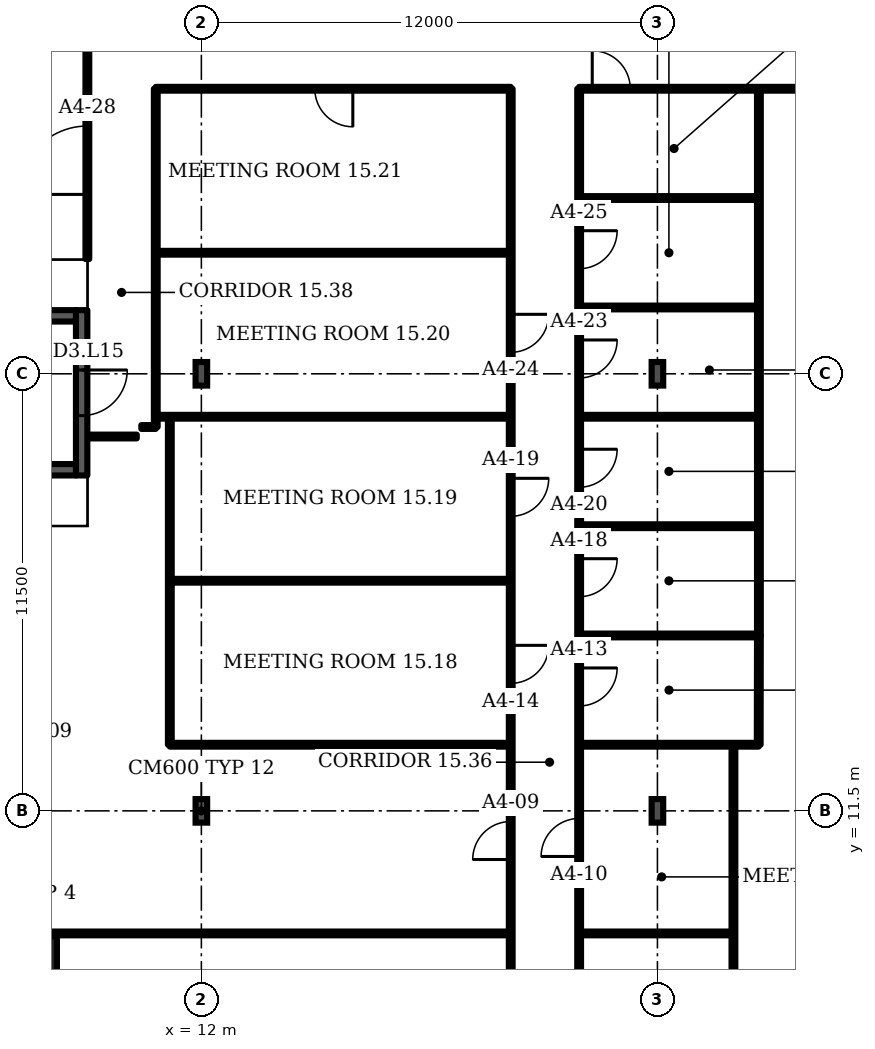
"""IFC4 building model, lengths in metres.
Left out: names, types, materials, properties, quantities, classifications, styles, units other than length and angle.
Written with IfcOpenShell. Run it as: python <this file> out.ifc"""

import sys

from ifc_helpers import new_model, si_unit, direction, frame, frame_2d, origin, origin_2d, place, context, subcontext, project, spatial, rectangle, i_section, extrude, element, fill, save


model = new_model("IFC4")
c1 = context("Model", 3, precision=1e-05, world=origin(), true_north=direction((0.0, 1.0)))
c2 = subcontext(c1, "Body", "Model", "MODEL_VIEW")
j1 = project(units=[si_unit("LENGTHUNIT", "METRE"), si_unit("PLANEANGLEUNIT", "RADIAN")], contexts=[c1])
p1 = place(None, origin())
s1 = spatial("IfcSite", under=j1, at=p1, CompositionType="ELEMENT")
p2 = place(p1, origin())
s2 = spatial("IfcBuilding", under=s1, at=p2, CompositionType="ELEMENT")
p3 = place(p2, frame((0.0, 0.0, 73.9)))
s3 = spatial("IfcBuildingStorey", under=s2, at=p3, CompositionType="ELEMENT", Elevation=73.9)
p4 = place(p3, frame((7.1, 7.1, 0.0), z_axis=(0.0, 0.0, 1.0), x_axis=(1.0, 0.0, 0.0)))
e1 = element("IfcColumn", 1, at=p4, inside=s3, PredefinedType="COLUMN", context=c2, shape_type="SweptSolid", body=[
    extrude(rectangle(XDim=2.2, YDim=2.2, at=origin_2d()), origin(), (0.0, 0.0, 1.0), 3.6),
])
for number, where, z_axis, x_axis in (
    (2, (12.0, 11.5, 0.0), (0.0, 0.0, 1.0), (1.0, 0.0, 0.0)),
    (3, (24.0, 11.5, 0.0), (0.0, 0.0, 1.0), (1.0, 0.0, 0.0)),
    (4, (12.0, 23.0, 0.0), (0.0, 0.0, 1.0), (1.0, 0.0, 0.0)),
    (5, (24.0, 23.0, 0.0), (0.0, 0.0, 1.0), (1.0, 0.0, 0.0)),
):
    element("IfcColumn", number, at=place(p3, frame(where, z_axis=z_axis, x_axis=x_axis)), inside=s3, PredefinedType="COLUMN", context=c2, shape_type="SweptSolid", body=[
        extrude(i_section(OverallWidth=0.305, OverallDepth=0.62, WebThickness=0.021, FlangeThickness=0.04, FilletRadius=0.027, at=origin_2d()), origin(), (0.0, 0.0, 1.0), 3.6),
    ])
p5 = place(p3, frame((8.85, 20.325, 0.0), z_axis=(0.0, 0.0, 1.0), x_axis=(0.0, 1.0, 0.0)))
e6 = element("IfcWall", 6, at=p5, inside=s3, PredefinedType="SHEAR", context=c2, shape_type="SweptSolid", body=[
    extrude(rectangle(XDim=4.35, YDim=0.3, at=frame_2d((2.175, 0.0))), origin(), (0.0, 0.0, 1.0), 3.2),
])
p6 = place(p5, frame((1.575, 0.0, 0.0)))
e7 = element("IfcOpeningElement", 7, at=p6, cuts=e6, PredefinedType="OPENING", context=c2, shape_type="SweptSolid", body=[
    extrude(rectangle(XDim=1.2, YDim=2.1, at=frame_2d((0.6, 1.05))), frame((0.0, 0.16, 0.0), z_axis=(0.0, -1.0, 0.0), x_axis=(1.0, 0.0, 0.0)), (0.0, 0.0, 1.0), 0.32),
])
p7 = place(p3, frame((6.0, 8.275, 0.0), z_axis=(0.0, 0.0, 1.0), x_axis=(1.0, 0.0, 0.0)))
e8 = element("IfcWall", 8, at=p7, inside=s3, PredefinedType="PARTITIONING", context=c2, shape_type="SweptSolid", body=[
    extrude(rectangle(XDim=14.14, YDim=0.1, at=frame_2d((7.07, 0.0))), origin(), (0.0, 0.0, 1.0), 3.2),
])
p8 = place(p3, frame((9.0, 26.02, 0.0), z_axis=(0.0, 0.0, 1.0), x_axis=(0.0, 1.0, 0.0)))
e9 = element("IfcWall", 9, at=p8, inside=s3, PredefinedType="PARTITIONING", context=c2, shape_type="SweptSolid", body=[
    extrude(rectangle(XDim=7.96, YDim=0.1, at=frame_2d((3.98, 0.0))), origin(), (0.0, 0.0, 1.0), 3.2),
])
p9 = place(p8, frame((1.7, 0.0, 0.0)))
e10 = element("IfcOpeningElement", 10, at=p9, cuts=e9, PredefinedType="OPENING", context=c2, shape_type="SweptSolid", body=[
    extrude(rectangle(XDim=1.8, YDim=2.1, at=frame_2d((0.9, 1.05))), frame((0.0, 0.06, 0.0), z_axis=(0.0, -1.0, 0.0), x_axis=(1.0, 0.0, 0.0)), (0.0, 0.0, 1.0), 0.12),
])
p10 = place(p3, frame((9.02, 21.35, 0.0), z_axis=(0.0, 0.0, 1.0), x_axis=(1.0, 0.0, 0.0)))
e11 = element("IfcWall", 11, at=p10, inside=s3, PredefinedType="PARTITIONING", context=c2, shape_type="SweptSolid", body=[
    extrude(rectangle(XDim=1.28, YDim=0.1, at=frame_2d((0.64, 0.0))), origin(), (0.0, 0.0, 1.0), 3.2),
])
p11 = place(p3, frame((10.42, 21.6, 0.0), z_axis=(0.0, 0.0, 1.0), x_axis=(1.0, 0.0, 0.0)))
e12 = element("IfcWall", 12, at=p11, inside=s3, PredefinedType="PARTITIONING", context=c2, shape_type="SweptSolid", body=[
    extrude(rectangle(XDim=0.38, YDim=0.1, at=frame_2d((0.19, 0.0))), origin(), (0.0, 0.0, 1.0), 3.2),
])
p12 = place(p3, frame((10.8, 21.6, 0.0), z_axis=(0.0, 0.0, 1.0), x_axis=(0.0, 1.0, 0.0)))
e13 = element("IfcWall", 13, at=p12, inside=s3, PredefinedType="PARTITIONING", context=c2, shape_type="SweptSolid", body=[
    extrude(rectangle(XDim=8.9, YDim=0.1, at=frame_2d((4.45, 0.0))), origin(), (0.0, 0.0, 1.0), 3.2),
])
for number, where, z_axis, x_axis in (
    (14, (10.8, 21.87, 0.0), (0.0, 0.0, 1.0), (1.0, 0.0, 0.0)),
    (15, (10.8, 26.185, 0.0), (0.0, 0.0, 1.0), (1.0, 0.0, 0.0)),
):
    element("IfcWall", number, at=place(p3, frame(where, z_axis=z_axis, x_axis=x_axis)), inside=s3, PredefinedType="PARTITIONING", context=c2, shape_type="SweptSolid", body=[
        extrude(rectangle(XDim=9.34, YDim=0.1, at=frame_2d((4.67, 0.0))), origin(), (0.0, 0.0, 1.0), 3.2),
    ])
p13 = place(p3, frame((10.8, 30.5, 0.0), z_axis=(0.0, 0.0, 1.0), x_axis=(1.0, 0.0, 0.0)))
e16 = element("IfcWall", 16, at=p13, inside=s3, PredefinedType="PARTITIONING", context=c2, shape_type="SweptSolid", body=[
    extrude(rectangle(XDim=9.34, YDim=0.1, at=frame_2d((4.67, 0.0))), origin(), (0.0, 0.0, 1.0), 3.2),
])
p14 = place(p13, frame((4.185, 0.0, 0.0)))
e17 = element("IfcOpeningElement", 17, at=p14, cuts=e16, PredefinedType="OPENING", context=c2, shape_type="SweptSolid", body=[
    extrude(rectangle(XDim=1.0, YDim=2.1, at=frame_2d((0.5, 1.05))), frame((0.0, 0.06, 0.0), z_axis=(0.0, -1.0, 0.0), x_axis=(1.0, 0.0, 0.0)), (0.0, 0.0, 1.0), 0.12),
])
p15 = place(p3, frame((11.17, 13.24, 0.0), z_axis=(0.0, 0.0, 1.0), x_axis=(0.0, 1.0, 0.0)))
e18 = element("IfcWall", 18, at=p15, inside=s3, PredefinedType="PARTITIONING", context=c2, shape_type="SweptSolid", body=[
    extrude(rectangle(XDim=8.63, YDim=0.1, at=frame_2d((4.315, 0.0))), origin(), (0.0, 0.0, 1.0), 3.2),
])
for number, where, z_axis, x_axis in (
    (19, (11.17, 13.24, 0.0), (0.0, 0.0, 1.0), (1.0, 0.0, 0.0)),
    (20, (11.17, 17.555, 0.0), (0.0, 0.0, 1.0), (1.0, 0.0, 0.0)),
):
    element("IfcWall", number, at=place(p3, frame(where, z_axis=z_axis, x_axis=x_axis)), inside=s3, PredefinedType="PARTITIONING", context=c2, shape_type="SweptSolid", body=[
        extrude(rectangle(XDim=8.97, YDim=0.1, at=frame_2d((4.485, 0.0))), origin(), (0.0, 0.0, 1.0), 3.2),
    ])
p16 = place(p3, frame((20.14, -1.13, 0.0), z_axis=(0.0, 0.0, 1.0), x_axis=(0.0, 1.0, 0.0)))
e21 = element("IfcWall", 21, at=p16, inside=s3, PredefinedType="PARTITIONING", context=c2, shape_type="SweptSolid", body=[
    extrude(rectangle(XDim=31.63, YDim=0.1, at=frame_2d((15.815, 0.0))), origin(), (0.0, 0.0, 1.0), 3.2),
])
p17 = place(p16, frame((1.825, 0.0, 0.0)))
e22 = element("IfcOpeningElement", 22, at=p17, cuts=e21, PredefinedType="OPENING", context=c2, shape_type="SweptSolid", body=[
    extrude(rectangle(XDim=1.0, YDim=2.1, at=frame_2d((0.5, 1.05))), frame((0.0, 0.06, 0.0), z_axis=(0.0, -1.0, 0.0), x_axis=(1.0, 0.0, 0.0)), (0.0, 0.0, 1.0), 0.12),
])
p18 = place(p16, frame((6.305, 0.0, 0.0)))
e23 = element("IfcOpeningElement", 23, at=p18, cuts=e21, PredefinedType="OPENING", context=c2, shape_type="SweptSolid", body=[
    extrude(rectangle(XDim=1.0, YDim=2.1, at=frame_2d((0.5, 1.05))), frame((0.0, 0.06, 0.0), z_axis=(0.0, -1.0, 0.0), x_axis=(1.0, 0.0, 0.0)), (0.0, 0.0, 1.0), 0.12),
])
p19 = place(p16, frame((11.35, 0.0, 0.0)))
e24 = element("IfcOpeningElement", 24, at=p19, cuts=e21, PredefinedType="OPENING", context=c2, shape_type="SweptSolid", body=[
    extrude(rectangle(XDim=1.0, YDim=2.1, at=frame_2d((0.5, 1.05))), frame((0.0, 0.06, 0.0), z_axis=(0.0, -1.0, 0.0), x_axis=(1.0, 0.0, 0.0)), (0.0, 0.0, 1.0), 0.12),
])
p20 = place(p16, frame((15.985, 0.0, 0.0)))
e25 = element("IfcOpeningElement", 25, at=p20, cuts=e21, PredefinedType="OPENING", context=c2, shape_type="SweptSolid", body=[
    extrude(rectangle(XDim=1.0, YDim=2.1, at=frame_2d((0.5, 1.05))), frame((0.0, 0.06, 0.0), z_axis=(0.0, -1.0, 0.0), x_axis=(1.0, 0.0, 0.0)), (0.0, 0.0, 1.0), 0.12),
])
p21 = place(p16, frame((20.38, 0.0, 0.0)))
e26 = element("IfcOpeningElement", 26, at=p21, cuts=e21, PredefinedType="OPENING", context=c2, shape_type="SweptSolid", body=[
    extrude(rectangle(XDim=1.0, YDim=2.1, at=frame_2d((0.5, 1.05))), frame((0.0, 0.06, 0.0), z_axis=(0.0, -1.0, 0.0), x_axis=(1.0, 0.0, 0.0)), (0.0, 0.0, 1.0), 0.12),
])
p22 = place(p16, frame((24.695, 0.0, 0.0)))
e27 = element("IfcOpeningElement", 27, at=p22, cuts=e21, PredefinedType="OPENING", context=c2, shape_type="SweptSolid", body=[
    extrude(rectangle(XDim=1.0, YDim=2.1, at=frame_2d((0.5, 1.05))), frame((0.0, 0.06, 0.0), z_axis=(0.0, -1.0, 0.0), x_axis=(1.0, 0.0, 0.0)), (0.0, 0.0, 1.0), 0.12),
])
p23 = place(p3, frame((21.94, -1.29, 0.0), z_axis=(0.0, 0.0, 1.0), x_axis=(0.0, 1.0, 0.0)))
e28 = element("IfcWall", 28, at=p23, inside=s3, PredefinedType="PARTITIONING", context=c2, shape_type="SweptSolid", body=[
    extrude(rectangle(XDim=31.79, YDim=0.1, at=frame_2d((15.895, 0.0))), origin(), (0.0, 0.0, 1.0), 3.2),
])
p24 = place(p23, frame((1.82, 0.0, 0.0)))
e29 = element("IfcOpeningElement", 29, at=p24, cuts=e28, PredefinedType="OPENING", context=c2, shape_type="SweptSolid", body=[
    extrude(rectangle(XDim=1.0, YDim=2.1, at=frame_2d((0.5, 1.05))), frame((0.0, 0.06, 0.0), z_axis=(0.0, -1.0, 0.0), x_axis=(1.0, 0.0, 0.0)), (0.0, 0.0, 1.0), 0.12),
])
p25 = place(p23, frame((6.63, 0.0, 0.0)))
e30 = element("IfcOpeningElement", 30, at=p25, cuts=e28, PredefinedType="OPENING", context=c2, shape_type="SweptSolid", body=[
    extrude(rectangle(XDim=1.0, YDim=2.1, at=frame_2d((0.5, 1.05))), frame((0.0, 0.06, 0.0), z_axis=(0.0, -1.0, 0.0), x_axis=(1.0, 0.0, 0.0)), (0.0, 0.0, 1.0), 0.12),
])
p26 = place(p23, frame((11.59, 0.0, 0.0)))
e31 = element("IfcOpeningElement", 31, at=p26, cuts=e28, PredefinedType="OPENING", context=c2, shape_type="SweptSolid", body=[
    extrude(rectangle(XDim=1.0, YDim=2.1, at=frame_2d((0.5, 1.05))), frame((0.0, 0.06, 0.0), z_axis=(0.0, -1.0, 0.0), x_axis=(1.0, 0.0, 0.0)), (0.0, 0.0, 1.0), 0.12),
])
p27 = place(p23, frame((15.55, 0.0, 0.0)))
e32 = element("IfcOpeningElement", 32, at=p27, cuts=e28, PredefinedType="OPENING", context=c2, shape_type="SweptSolid", body=[
    extrude(rectangle(XDim=1.0, YDim=2.1, at=frame_2d((0.5, 1.05))), frame((0.0, 0.06, 0.0), z_axis=(0.0, -1.0, 0.0), x_axis=(1.0, 0.0, 0.0)), (0.0, 0.0, 1.0), 0.12),
])
p28 = place(p23, frame((18.425, 0.0, 0.0)))
e33 = element("IfcOpeningElement", 33, at=p28, cuts=e28, PredefinedType="OPENING", context=c2, shape_type="SweptSolid", body=[
    extrude(rectangle(XDim=1.0, YDim=2.1, at=frame_2d((0.5, 1.05))), frame((0.0, 0.06, 0.0), z_axis=(0.0, -1.0, 0.0), x_axis=(1.0, 0.0, 0.0)), (0.0, 0.0, 1.0), 0.12),
])
p29 = place(p23, frame((21.305, 0.0, 0.0)))
e34 = element("IfcOpeningElement", 34, at=p29, cuts=e28, PredefinedType="OPENING", context=c2, shape_type="SweptSolid", body=[
    extrude(rectangle(XDim=1.0, YDim=2.1, at=frame_2d((0.5, 1.05))), frame((0.0, 0.06, 0.0), z_axis=(0.0, -1.0, 0.0), x_axis=(1.0, 0.0, 0.0)), (0.0, 0.0, 1.0), 0.12),
])
p30 = place(p23, frame((24.18, 0.0, 0.0)))
e35 = element("IfcOpeningElement", 35, at=p30, cuts=e28, PredefinedType="OPENING", context=c2, shape_type="SweptSolid", body=[
    extrude(rectangle(XDim=1.0, YDim=2.1, at=frame_2d((0.5, 1.05))), frame((0.0, 0.06, 0.0), z_axis=(0.0, -1.0, 0.0), x_axis=(1.0, 0.0, 0.0)), (0.0, 0.0, 1.0), 0.12),
])
p31 = place(p23, frame((27.055, 0.0, 0.0)))
e36 = element("IfcOpeningElement", 36, at=p31, cuts=e28, PredefinedType="OPENING", context=c2, shape_type="SweptSolid", body=[
    extrude(rectangle(XDim=1.0, YDim=2.1, at=frame_2d((0.5, 1.05))), frame((0.0, 0.06, 0.0), z_axis=(0.0, -1.0, 0.0), x_axis=(1.0, 0.0, 0.0)), (0.0, 0.0, 1.0), 0.12),
])
p32 = place(p3, frame((21.94, 8.275, 0.0), z_axis=(0.0, 0.0, 1.0), x_axis=(1.0, 0.0, 0.0)))
e37 = element("IfcWall", 37, at=p32, inside=s3, PredefinedType="PARTITIONING", context=c2, shape_type="SweptSolid", body=[
    extrude(rectangle(XDim=4.06, YDim=0.1, at=frame_2d((2.03, 0.0))), origin(), (0.0, 0.0, 1.0), 3.2),
])
for number, where, z_axis, x_axis in (
    (38, (21.94, 13.24, 0.0), (0.0, 0.0, 1.0), (1.0, 0.0, 0.0)),
    (39, (21.94, 16.115, 0.0), (0.0, 0.0, 1.0), (1.0, 0.0, 0.0)),
    (40, (21.94, 18.99, 0.0), (0.0, 0.0, 1.0), (1.0, 0.0, 0.0)),
    (41, (21.94, 21.87, 0.0), (0.0, 0.0, 1.0), (1.0, 0.0, 0.0)),
    (42, (21.94, 24.745, 0.0), (0.0, 0.0, 1.0), (1.0, 0.0, 0.0)),
    (43, (21.94, 27.625, 0.0), (0.0, 0.0, 1.0), (1.0, 0.0, 0.0)),
):
    element("IfcWall", number, at=place(p3, frame(where, z_axis=z_axis, x_axis=x_axis)), inside=s3, PredefinedType="PARTITIONING", context=c2, shape_type="SweptSolid", body=[
        extrude(rectangle(XDim=4.725, YDim=0.1, at=frame_2d((2.363, 0.0))), origin(), (0.0, 0.0, 1.0), 3.2),
    ])
p33 = place(p3, frame((21.94, 30.5, 0.0), z_axis=(0.0, 0.0, 1.0), x_axis=(1.0, 0.0, 0.0)))
e44 = element("IfcWall", 44, at=p33, inside=s3, PredefinedType="PARTITIONING", context=c2, shape_type="SweptSolid", body=[
    extrude(rectangle(XDim=14.91, YDim=0.1, at=frame_2d((7.455, 0.0))), origin(), (0.0, 0.0, 1.0), 3.2),
])
p34 = place(p33, frame((0.345, 0.0, 0.0)))
e45 = element("IfcOpeningElement", 45, at=p34, cuts=e44, PredefinedType="OPENING", context=c2, shape_type="SweptSolid", body=[
    extrude(rectangle(XDim=1.0, YDim=2.1, at=frame_2d((0.5, 1.05))), frame((0.0, 0.06, 0.0), z_axis=(0.0, -1.0, 0.0), x_axis=(1.0, 0.0, 0.0)), (0.0, 0.0, 1.0), 0.12),
])
p35 = place(p33, frame((8.95, 0.0, 0.0)))
e46 = element("IfcOpeningElement", 46, at=p35, cuts=e44, PredefinedType="OPENING", context=c2, shape_type="SweptSolid", body=[
    extrude(rectangle(XDim=1.8, YDim=2.1, at=frame_2d((0.9, 1.05))), frame((0.0, 0.06, 0.0), z_axis=(0.0, -1.0, 0.0), x_axis=(1.0, 0.0, 0.0)), (0.0, 0.0, 1.0), 0.12),
])
p36 = place(p3, frame((26.0, -1.645, 0.0), z_axis=(0.0, 0.0, 1.0), x_axis=(0.0, 1.0, 0.0)))
e47 = element("IfcWall", 47, at=p36, inside=s3, PredefinedType="PARTITIONING", context=c2, shape_type="SweptSolid", body=[
    extrude(rectangle(XDim=14.885, YDim=0.1, at=frame_2d((7.442, 0.0))), origin(), (0.0, 0.0, 1.0), 3.2),
])
p37 = place(p3, frame((26.665, 13.24, 0.0), z_axis=(0.0, 0.0, 1.0), x_axis=(0.001698, 0.999995, 0.0)))
e48 = element("IfcWall", 48, at=p37, inside=s3, PredefinedType="PARTITIONING", context=c2, shape_type="SweptSolid", body=[
    extrude(rectangle(XDim=2.875, YDim=0.1, at=frame_2d((1.438, 0.0))), origin(), (0.0, 0.0, 1.0), 3.2),
])
p38 = place(p3, frame((26.67, 16.115, 0.0), z_axis=(0.0, 0.0, 1.0), x_axis=(0.0, 1.0, 0.0)))
e49 = element("IfcWall", 49, at=p38, inside=s3, PredefinedType="PARTITIONING", context=c2, shape_type="SweptSolid", body=[
    extrude(rectangle(XDim=14.385, YDim=0.1, at=frame_2d((7.192, 0.0))), origin(), (0.0, 0.0, 1.0), 3.2),
])
for number, where, z_axis, x_axis in (
    (50, (1.2, 20.475, 0.0), (0.0, 0.0, 1.0), (1.0, 0.0, 0.0)),
    (51, (1.2, 24.525, 0.0), (0.0, 0.0, 1.0), (1.0, 0.0, 0.0)),
):
    element("IfcWall", number, at=place(p3, frame(where, z_axis=z_axis, x_axis=x_axis)), inside=s3, PredefinedType="SHEAR", context=c2, shape_type="SweptSolid", body=[
        extrude(rectangle(XDim=7.5, YDim=0.3, at=frame_2d((3.75, 0.0))), origin(), (0.0, 0.0, 1.0), 3.2),
    ])
p39 = place(p6, origin())
e52 = element("IfcDoor", 52, at=p39, inside=s3, OperationType="SINGLE_SWING_RIGHT", PredefinedType="DOOR", context=c2, shape_type="SweptSolid", body=[
    extrude(rectangle(XDim=1.2, YDim=2.1, at=frame_2d((0.6, 1.05))), frame((0.0, 0.025, 0.0), z_axis=(0.0, -1.0, 0.0), x_axis=(1.0, 0.0, 0.0)), (0.0, 0.0, 1.0), 0.05),
])
fill(e7, e52)
p40 = place(p19, origin())
e53 = element("IfcDoor", 53, at=p40, inside=s3, OperationType="SINGLE_SWING_LEFT", PredefinedType="DOOR", context=c2, shape_type="SweptSolid", body=[
    extrude(rectangle(XDim=1.0, YDim=2.1, at=frame_2d((0.5, 1.05))), frame((0.0, 0.025, 0.0), z_axis=(0.0, -1.0, 0.0), x_axis=(1.0, 0.0, 0.0)), (0.0, 0.0, 1.0), 0.05),
])
fill(e24, e53)
p41 = place(p26, origin())
e54 = element("IfcDoor", 54, at=p41, inside=s3, OperationType="SINGLE_SWING_LEFT", PredefinedType="DOOR", context=c2, shape_type="SweptSolid", body=[
    extrude(rectangle(XDim=1.0, YDim=2.1, at=frame_2d((0.5, 1.05))), frame((0.0, 0.025, 0.0), z_axis=(0.0, -1.0, 0.0), x_axis=(1.0, 0.0, 0.0)), (0.0, 0.0, 1.0), 0.05),
])
fill(e31, e54)
p42 = place(p27, origin())
e55 = element("IfcDoor", 55, at=p42, inside=s3, OperationType="SINGLE_SWING_RIGHT", PredefinedType="DOOR", context=c2, shape_type="SweptSolid", body=[
    extrude(rectangle(XDim=1.0, YDim=2.1, at=frame_2d((0.5, 1.05))), frame((0.0, 0.025, 0.0), z_axis=(0.0, -1.0, 0.0), x_axis=(1.0, 0.0, 0.0)), (0.0, 0.0, 1.0), 0.05),
])
fill(e32, e55)
p43 = place(p20, origin())
e56 = element("IfcDoor", 56, at=p43, inside=s3, OperationType="SINGLE_SWING_RIGHT", PredefinedType="DOOR", context=c2, shape_type="SweptSolid", body=[
    extrude(rectangle(XDim=1.0, YDim=2.1, at=frame_2d((0.5, 1.05))), frame((0.0, 0.025, 0.0), z_axis=(0.0, -1.0, 0.0), x_axis=(1.0, 0.0, 0.0)), (0.0, 0.0, 1.0), 0.05),
])
fill(e25, e56)
p44 = place(p28, origin())
e57 = element("IfcDoor", 57, at=p44, inside=s3, OperationType="SINGLE_SWING_RIGHT", PredefinedType="DOOR", context=c2, shape_type="SweptSolid", body=[
    extrude(rectangle(XDim=1.0, YDim=2.1, at=frame_2d((0.5, 1.05))), frame((0.0, 0.025, 0.0), z_axis=(0.0, -1.0, 0.0), x_axis=(1.0, 0.0, 0.0)), (0.0, 0.0, 1.0), 0.05),
])
fill(e33, e57)
p45 = place(p21, origin())
e58 = element("IfcDoor", 58, at=p45, inside=s3, OperationType="SINGLE_SWING_RIGHT", PredefinedType="DOOR", context=c2, shape_type="SweptSolid", body=[
    extrude(rectangle(XDim=1.0, YDim=2.1, at=frame_2d((0.5, 1.05))), frame((0.0, 0.025, 0.0), z_axis=(0.0, -1.0, 0.0), x_axis=(1.0, 0.0, 0.0)), (0.0, 0.0, 1.0), 0.05),
])
fill(e26, e58)
p46 = place(p29, origin())
e59 = element("IfcDoor", 59, at=p46, inside=s3, OperationType="SINGLE_SWING_RIGHT", PredefinedType="DOOR", context=c2, shape_type="SweptSolid", body=[
    extrude(rectangle(XDim=1.0, YDim=2.1, at=frame_2d((0.5, 1.05))), frame((0.0, 0.025, 0.0), z_axis=(0.0, -1.0, 0.0), x_axis=(1.0, 0.0, 0.0)), (0.0, 0.0, 1.0), 0.05),
])
fill(e34, e59)
p47 = place(p30, origin())
e60 = element("IfcDoor", 60, at=p47, inside=s3, OperationType="SINGLE_SWING_RIGHT", PredefinedType="DOOR", context=c2, shape_type="SweptSolid", body=[
    extrude(rectangle(XDim=1.0, YDim=2.1, at=frame_2d((0.5, 1.05))), frame((0.0, 0.025, 0.0), z_axis=(0.0, -1.0, 0.0), x_axis=(1.0, 0.0, 0.0)), (0.0, 0.0, 1.0), 0.05),
])
fill(e35, e60)
p48 = place(p22, origin())
e61 = element("IfcDoor", 61, at=p48, inside=s3, OperationType="SINGLE_SWING_RIGHT", PredefinedType="DOOR", context=c2, shape_type="SweptSolid", body=[
    extrude(rectangle(XDim=1.0, YDim=2.1, at=frame_2d((0.5, 1.05))), frame((0.0, 0.025, 0.0), z_axis=(0.0, -1.0, 0.0), x_axis=(1.0, 0.0, 0.0)), (0.0, 0.0, 1.0), 0.05),
])
fill(e27, e61)
p49 = place(p31, origin())
e62 = element("IfcDoor", 62, at=p49, inside=s3, OperationType="SINGLE_SWING_RIGHT", PredefinedType="DOOR", context=c2, shape_type="SweptSolid", body=[
    extrude(rectangle(XDim=1.0, YDim=2.1, at=frame_2d((0.5, 1.05))), frame((0.0, 0.025, 0.0), z_axis=(0.0, -1.0, 0.0), x_axis=(1.0, 0.0, 0.0)), (0.0, 0.0, 1.0), 0.05),
])
fill(e36, e62)
p50 = place(p9, origin())
e63 = element("IfcDoor", 63, at=p50, inside=s3, OperationType="DOUBLE_DOOR_SINGLE_SWING", PredefinedType="DOOR", context=c2, shape_type="SweptSolid", body=[
    extrude(rectangle(XDim=1.8, YDim=2.1, at=frame_2d((0.9, 1.05))), frame((0.0, 0.025, 0.0), z_axis=(0.0, -1.0, 0.0), x_axis=(1.0, 0.0, 0.0)), (0.0, 0.0, 1.0), 0.05),
])
fill(e10, e63)
p51 = place(p14, origin())
e64 = element("IfcDoor", 64, at=p51, inside=s3, OperationType="SINGLE_SWING_RIGHT", PredefinedType="DOOR", context=c2, shape_type="SweptSolid", body=[
    extrude(rectangle(XDim=1.0, YDim=2.1, at=frame_2d((0.5, 1.05))), frame((0.0, 0.025, 0.0), z_axis=(0.0, -1.0, 0.0), x_axis=(1.0, 0.0, 0.0)), (0.0, 0.0, 1.0), 0.05),
])
fill(e17, e64)
p52 = place(p34, origin())
e65 = element("IfcDoor", 65, at=p52, inside=s3, OperationType="SINGLE_SWING_LEFT", PredefinedType="DOOR", context=c2, shape_type="SweptSolid", body=[
    extrude(rectangle(XDim=1.0, YDim=2.1, at=frame_2d((0.5, 1.05))), frame((0.0, 0.025, 0.0), z_axis=(0.0, -1.0, 0.0), x_axis=(1.0, 0.0, 0.0)), (0.0, 0.0, 1.0), 0.05),
])
fill(e45, e65)
save(model, sys.argv[1])
